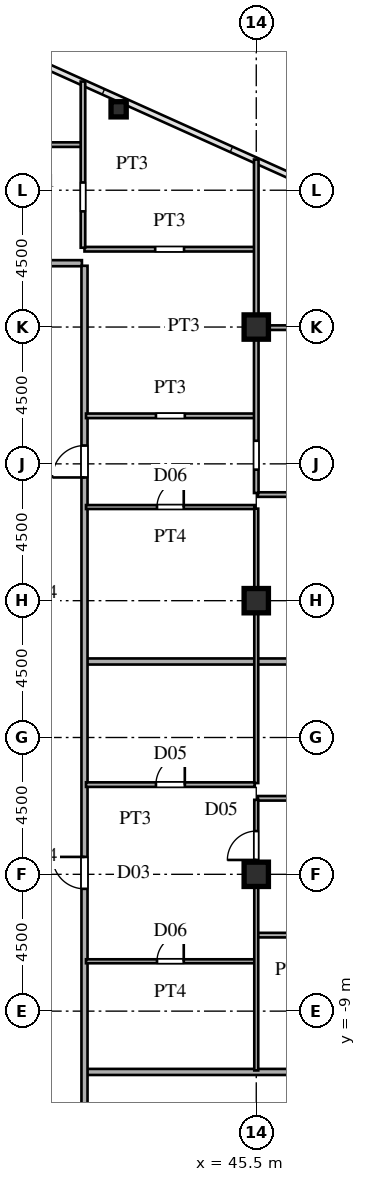
"""IFC4 building model, lengths in metres.
Left out: names, types, materials, properties, quantities, classifications, styles, units other than length and angle.
Written with IfcOpenShell. Run it as: python <this file> out.ifc"""

import sys

from ifc_helpers import new_model, si_unit, direction, frame, frame_2d, origin, origin_2d, place, context, subcontext, project, spatial, rectangle, hollow_rectangle, i_section, extrude, source, transform, mapped, element, fill, save


model = new_model("IFC4")
c1 = context("Model", 3, precision=1e-05, world=origin(), true_north=direction((0.0, 1.0)))
c2 = subcontext(c1, "Body", "Model", "MODEL_VIEW")
j1 = project(units=[si_unit("LENGTHUNIT", "METRE"), si_unit("PLANEANGLEUNIT", "RADIAN")], contexts=[c1])
p1 = place(None, origin())
s1 = spatial("IfcSite", under=j1, at=p1, CompositionType="ELEMENT")
p2 = place(p1, origin())
s2 = spatial("IfcBuilding", under=s1, at=p2, CompositionType="ELEMENT")
p3 = place(p2, frame((0.0, 0.0, 106.8)))
s3 = spatial("IfcBuildingStorey", under=s2, at=p3, CompositionType="ELEMENT", Elevation=106.8)
m1 = source(origin(), c2, "Body", "SweptSolid", [
    extrude(i_section(OverallWidth=0.8, OverallDepth=0.8, WebThickness=0.032, FlangeThickness=0.05, at=origin_2d()), origin(), (0.0, 0.0, 1.0), 3.6),
])
for number, where, z_axis, x_axis in (
    (1, (45.5, -4.5, 0.0), (0.0, 0.0, 1.0), (1.0, 0.0, 0.0)),
    (2, (45.5, 4.5, 0.0), (0.0, 0.0, 1.0), (1.0, 0.0, 0.0)),
    (3, (45.5, 13.5, 0.0), (0.0, 0.0, 1.0), (1.0, 0.0, 0.0)),
):
    element("IfcColumn", number, at=place(p3, frame(where, z_axis=z_axis, x_axis=x_axis)), inside=s3, PredefinedType="COLUMN", context=c2, shape_type="MappedRepresentation", body=[
        mapped(m1, transform((0.0, 0.0, 0.0), scale=1.0)),
    ])
m2 = source(origin(), c2, "Body", "SweptSolid", [
    extrude(hollow_rectangle(XDim=0.5, YDim=0.5, WallThickness=0.02, at=origin_2d()), origin(), (0.0, 0.0, 1.0), 3.6),
])
p4 = place(p3, frame((40.973, 20.661, 0.0), z_axis=(0.0, 0.0, 1.0), x_axis=(1.0, 0.0, 0.0)))
e4 = element("IfcColumn", 4, at=p4, inside=s3, PredefinedType="COLUMN", context=c2, shape_type="MappedRepresentation", body=[
    mapped(m2, transform((0.0, 0.0, 0.0), scale=1.0)),
])
p5 = place(p3, frame((39.93, -11.0, 0.0), z_axis=(0.0, 0.0, 1.0), x_axis=(1.0, 0.0, 0.0)))
e5 = element("IfcWall", 5, at=p5, inside=s3, PredefinedType="PARTITIONING", context=c2, shape_type="SweptSolid", body=[
    extrude(rectangle(XDim=23.304, YDim=0.2, at=frame_2d((11.652, 0.0))), origin(), (0.0, 0.0, 1.0), 3.38),
])
p6 = place(p3, frame((39.9, -7.36, 0.0), z_axis=(0.0, 0.0, 1.0), x_axis=(1.0, 0.0, 0.0)))
e6 = element("IfcWall", 6, at=p6, inside=s3, PredefinedType="PARTITIONING", context=c2, shape_type="SweptSolid", body=[
    extrude(rectangle(XDim=5.55, YDim=0.13, at=frame_2d((2.775, 0.0))), origin(), (0.0, 0.0, 1.0), 3.38),
])
p7 = place(p6, frame((2.335, 0.0, 0.0)))
e7 = element("IfcOpeningElement", 7, at=p7, cuts=e6, PredefinedType="OPENING", context=c2, shape_type="SweptSolid", body=[
    extrude(rectangle(XDim=0.88, YDim=2.1, at=frame_2d((0.44, 1.05))), frame((0.0, 0.075, 0.0), z_axis=(0.0, -1.0, 0.0), x_axis=(1.0, 0.0, 0.0)), (0.0, 0.0, 1.0), 0.15),
])
p8 = place(p3, frame((45.55, -6.5, 0.0), z_axis=(0.0, 0.0, 1.0), x_axis=(1.0, 0.0, 0.0)))
e8 = element("IfcWall", 8, at=p8, inside=s3, PredefinedType="PARTITIONING", context=c2, shape_type="SweptSolid", body=[
    extrude(rectangle(XDim=25.325, YDim=0.15, at=frame_2d((12.663, 0.0))), origin(), (0.0, 0.0, 1.0), 3.38),
])
p9 = place(p8, frame((3.975, 0.0, 0.0)))
e9 = element("IfcOpeningElement", 9, at=p9, cuts=e8, PredefinedType="OPENING", context=c2, shape_type="SweptSolid", body=[
    extrude(rectangle(XDim=0.95, YDim=2.15, at=frame_2d((0.475, 1.075))), frame((0.0, 0.085, 0.0), z_axis=(0.0, -1.0, 0.0), x_axis=(1.0, 0.0, 0.0)), (0.0, 0.0, 1.0), 0.17),
])
p10 = place(p8, frame((11.617, 0.0, 0.0)))
e10 = element("IfcOpeningElement", 10, at=p10, cuts=e8, PredefinedType="OPENING", context=c2, shape_type="SweptSolid", body=[
    extrude(rectangle(XDim=0.95, YDim=2.15, at=frame_2d((0.475, 1.075))), frame((0.0, 0.085, 0.0), z_axis=(0.0, -1.0, 0.0), x_axis=(1.0, 0.0, 0.0)), (0.0, 0.0, 1.0), 0.17),
])
p11 = place(p3, frame((45.55, -2.0, 0.0), z_axis=(0.0, 0.0, 1.0), x_axis=(1.0, 0.0, 0.0)))
e11 = element("IfcWall", 11, at=p11, inside=s3, PredefinedType="PARTITIONING", context=c2, shape_type="SweptSolid", body=[
    extrude(rectangle(XDim=25.485, YDim=0.15, at=frame_2d((12.742, 0.0))), origin(), (0.0, 0.0, 1.0), 3.38),
])
p12 = place(p11, frame((3.975, 0.0, 0.0)))
e12 = element("IfcOpeningElement", 12, at=p12, cuts=e11, PredefinedType="OPENING", context=c2, shape_type="SweptSolid", body=[
    extrude(rectangle(XDim=0.95, YDim=2.15, at=frame_2d((0.475, 1.075))), frame((0.0, 0.085, 0.0), z_axis=(0.0, -1.0, 0.0), x_axis=(1.0, 0.0, 0.0)), (0.0, 0.0, 1.0), 0.17),
])
p13 = place(p11, frame((11.325, 0.0, 0.0)))
e13 = element("IfcOpeningElement", 13, at=p13, cuts=e11, PredefinedType="OPENING", context=c2, shape_type="SweptSolid", body=[
    extrude(rectangle(XDim=0.95, YDim=2.15, at=frame_2d((0.475, 1.075))), frame((0.0, 0.085, 0.0), z_axis=(0.0, -1.0, 0.0), x_axis=(1.0, 0.0, 0.0)), (0.0, 0.0, 1.0), 0.17),
])
p14 = place(p3, frame((39.9, -1.55, 0.0), z_axis=(0.0, 0.0, 1.0), x_axis=(1.0, 0.0, 0.0)))
e14 = element("IfcWall", 14, at=p14, inside=s3, PredefinedType="PARTITIONING", context=c2, shape_type="SweptSolid", body=[
    extrude(rectangle(XDim=5.55, YDim=0.15, at=frame_2d((2.775, 0.0))), origin(), (0.0, 0.0, 1.0), 3.38),
])
p15 = place(p14, frame((2.3, 0.0, 0.0)))
e15 = element("IfcOpeningElement", 15, at=p15, cuts=e14, PredefinedType="OPENING", context=c2, shape_type="SweptSolid", body=[
    extrude(rectangle(XDim=0.95, YDim=2.15, at=frame_2d((0.475, 1.075))), frame((0.0, 0.085, 0.0), z_axis=(0.0, -1.0, 0.0), x_axis=(1.0, 0.0, 0.0)), (0.0, 0.0, 1.0), 0.17),
])
p16 = place(p3, frame((39.93, 2.5, 0.0), z_axis=(0.0, 0.0, 1.0), x_axis=(1.0, 0.0, 0.0)))
e16 = element("IfcWall", 16, at=p16, inside=s3, PredefinedType="PARTITIONING", context=c2, shape_type="SweptSolid", body=[
    extrude(rectangle(XDim=31.075, YDim=0.2, at=frame_2d((15.538, 0.0))), origin(), (0.0, 0.0, 1.0), 3.38),
])
p17 = place(p3, frame((39.9, 7.58, 0.0), z_axis=(0.0, 0.0, 1.0), x_axis=(1.0, 0.0, 0.0)))
e17 = element("IfcWall", 17, at=p17, inside=s3, PredefinedType="PARTITIONING", context=c2, shape_type="SweptSolid", body=[
    extrude(rectangle(XDim=5.55, YDim=0.13, at=frame_2d((2.775, 0.0))), origin(), (0.0, 0.0, 1.0), 3.38),
])
p18 = place(p17, frame((2.335, 0.0, 0.0)))
e18 = element("IfcOpeningElement", 18, at=p18, cuts=e17, PredefinedType="OPENING", context=c2, shape_type="SweptSolid", body=[
    extrude(rectangle(XDim=0.88, YDim=2.1, at=frame_2d((0.44, 1.05))), frame((0.0, 0.075, 0.0), z_axis=(0.0, -1.0, 0.0), x_axis=(1.0, 0.0, 0.0)), (0.0, 0.0, 1.0), 0.15),
])
p19 = place(p3, frame((45.55, 7.99, 0.0), z_axis=(0.0, 0.0, 1.0), x_axis=(1.0, 0.0, 0.0)))
e19 = element("IfcWall", 19, at=p19, inside=s3, PredefinedType="PARTITIONING", context=c2, shape_type="SweptSolid", body=[
    extrude(rectangle(XDim=24.392, YDim=0.15, at=frame_2d((12.196, 0.0))), origin(), (0.0, 0.0, 1.0), 3.38),
])
p20 = place(p19, frame((3.975, 0.0, 0.0)))
e20 = element("IfcOpeningElement", 20, at=p20, cuts=e19, PredefinedType="OPENING", context=c2, shape_type="SweptSolid", body=[
    extrude(rectangle(XDim=0.95, YDim=2.15, at=frame_2d((0.475, 1.075))), frame((0.0, 0.085, 0.0), z_axis=(0.0, -1.0, 0.0), x_axis=(1.0, 0.0, 0.0)), (0.0, 0.0, 1.0), 0.17),
])
p21 = place(p3, frame((39.9, 10.58, 0.0), z_axis=(0.0, 0.0, 1.0), x_axis=(1.0, 0.0, 0.0)))
e21 = element("IfcWall", 21, at=p21, inside=s3, PredefinedType="PARTITIONING", context=c2, shape_type="SweptSolid", body=[
    extrude(rectangle(XDim=5.55, YDim=0.15, at=frame_2d((2.775, 0.0))), origin(), (0.0, 0.0, 1.0), 3.38),
])
p22 = place(p21, frame((2.3, 0.0, 0.0)))
e22 = element("IfcOpeningElement", 22, at=p22, cuts=e21, PredefinedType="OPENING", context=c2, shape_type="SweptSolid", body=[
    extrude(rectangle(XDim=0.95, YDim=2.15, at=frame_2d((0.475, 1.075))), frame((0.0, 0.085, 0.0), z_axis=(0.0, -1.0, 0.0), x_axis=(1.0, 0.0, 0.0)), (0.0, 0.0, 1.0), 0.17),
])
p23 = place(p3, frame((45.55, 13.48, 0.0), z_axis=(0.0, 0.0, 1.0), x_axis=(1.0, 0.0, 0.0)))
e23 = element("IfcWall", 23, at=p23, inside=s3, PredefinedType="PARTITIONING", context=c2, shape_type="SweptSolid", body=[
    extrude(rectangle(XDim=1.424, YDim=0.15, at=frame_2d((0.712, 0.0))), origin(), (0.0, 0.0, 1.0), 2.08),
])
p24 = place(p3, frame((36.585, 15.6, 0.0), z_axis=(0.0, 0.0, 1.0), x_axis=(1.0, 0.0, 0.0)))
e24 = element("IfcWall", 24, at=p24, inside=s3, PredefinedType="PARTITIONING", context=c2, shape_type="SweptSolid", body=[
    extrude(rectangle(XDim=3.18, YDim=0.2, at=frame_2d((1.59, 0.0))), origin(), (0.0, 0.0, 1.0), 3.38),
])
p25 = place(p3, frame((39.85, 16.06, 0.0), z_axis=(0.0, 0.0, 1.0), x_axis=(1.0, 0.0, 0.0)))
e25 = element("IfcWall", 25, at=p25, inside=s3, PredefinedType="PARTITIONING", context=c2, shape_type="SweptSolid", body=[
    extrude(rectangle(XDim=5.6, YDim=0.15, at=frame_2d((2.8, 0.0))), origin(), (0.0, 0.0, 1.0), 3.38),
])
p26 = place(p25, frame((2.325, 0.0, 0.0)))
e26 = element("IfcOpeningElement", 26, at=p26, cuts=e25, PredefinedType="OPENING", context=c2, shape_type="SweptSolid", body=[
    extrude(rectangle(XDim=0.95, YDim=2.15, at=frame_2d((0.475, 1.075))), frame((0.0, 0.085, 0.0), z_axis=(0.0, -1.0, 0.0), x_axis=(1.0, 0.0, 0.0)), (0.0, 0.0, 1.0), 0.17),
])
p27 = place(p3, frame((27.465, 19.5, 0.0), z_axis=(0.0, 0.0, 1.0), x_axis=(1.0, 0.0, 0.0)))
e27 = element("IfcWall", 27, at=p27, inside=s3, PredefinedType="PARTITIONING", context=c2, shape_type="SweptSolid", body=[
    extrude(rectangle(XDim=12.285, YDim=0.15, at=frame_2d((6.143, 0.0))), origin(), (0.0, 0.0, 1.0), 3.38),
])
p28 = place(p27, frame((4.625, 0.0, 0.0)))
e28 = element("IfcOpeningElement", 28, at=p28, cuts=e27, PredefinedType="OPENING", context=c2, shape_type="SweptSolid", body=[
    extrude(rectangle(XDim=0.95, YDim=2.15, at=frame_2d((0.475, 1.075))), frame((0.0, 0.085, 0.0), z_axis=(0.0, -1.0, 0.0), x_axis=(1.0, 0.0, 0.0)), (0.0, 0.0, 1.0), 0.17),
])
p29 = place(p3, frame((39.8, 16.109, 0.0), z_axis=(0.0, 0.0, 1.0), x_axis=(0.0, 1.0, 0.0)))
e29 = element("IfcWall", 29, at=p29, inside=s3, PredefinedType="PARTITIONING", context=c2, shape_type="SweptSolid", body=[
    extrude(rectangle(XDim=5.466, YDim=0.15, at=frame_2d((2.733, 0.0))), origin(), (0.0, 0.0, 1.0), 3.38),
])
p30 = place(p29, frame((1.195, 0.0, 0.0)))
e30 = element("IfcOpeningElement", 30, at=p30, cuts=e29, PredefinedType="OPENING", context=c2, shape_type="SweptSolid", body=[
    extrude(rectangle(XDim=0.95, YDim=2.15, at=frame_2d((0.475, 1.075))), frame((0.0, 0.085, 0.0), z_axis=(0.0, -1.0, 0.0), x_axis=(1.0, 0.0, 0.0)), (0.0, 0.0, 1.0), 0.17),
])
p31 = place(p3, frame((39.85, -15.515, 0.0), z_axis=(0.0, 0.0, 1.0), x_axis=(0.0, 1.0, 0.0)))
e31 = element("IfcWall", 31, at=p31, inside=s3, PredefinedType="PARTITIONING", context=c2, shape_type="SweptSolid", body=[
    extrude(rectangle(XDim=31.03, YDim=0.2, at=frame_2d((15.515, 0.0))), origin(), (0.0, 0.0, 1.0), 3.38),
])
p32 = place(p31, frame((1.69, 0.0, 0.0)))
e32 = element("IfcOpeningElement", 32, at=p32, cuts=e31, PredefinedType="OPENING", context=c2, shape_type="SweptSolid", body=[
    extrude(rectangle(XDim=1.05, YDim=2.25, at=frame_2d((0.525, 1.125))), frame((0.0, 0.11, 0.0), z_axis=(0.0, -1.0, 0.0), x_axis=(1.0, 0.0, 0.0)), (0.0, 0.0, 1.0), 0.22),
])
p33 = place(p31, frame((10.538, 0.0, 0.0)))
e33 = element("IfcOpeningElement", 33, at=p33, cuts=e31, PredefinedType="OPENING", context=c2, shape_type="SweptSolid", body=[
    extrude(rectangle(XDim=1.05, YDim=2.25, at=frame_2d((0.525, 1.125))), frame((0.0, 0.11, 0.0), z_axis=(0.0, -1.0, 0.0), x_axis=(1.0, 0.0, 0.0)), (0.0, 0.0, 1.0), 0.22),
])
p34 = place(p31, frame((24.067, 0.0, 0.0)))
e34 = element("IfcOpeningElement", 34, at=p34, cuts=e31, PredefinedType="OPENING", context=c2, shape_type="SweptSolid", body=[
    extrude(rectangle(XDim=1.05, YDim=2.25, at=frame_2d((0.525, 1.125))), frame((0.0, 0.11, 0.0), z_axis=(0.0, -1.0, 0.0), x_axis=(1.0, 0.0, 0.0)), (0.0, 0.0, 1.0), 0.22),
])
p35 = place(p3, frame((45.5, -10.95, 0.0), z_axis=(0.0, 0.0, 1.0), x_axis=(0.0, 1.0, 0.0)))
e35 = element("IfcWall", 35, at=p35, inside=s3, PredefinedType="PARTITIONING", context=c2, shape_type="SweptSolid", body=[
    extrude(rectangle(XDim=8.9, YDim=0.13, at=frame_2d((4.45, 0.0))), origin(), (0.0, 0.0, 1.0), 2.78),
])
p36 = place(p35, frame((6.923, 0.0, 0.0)))
e36 = element("IfcOpeningElement", 36, at=p36, cuts=e35, PredefinedType="OPENING", context=c2, shape_type="SweptSolid", body=[
    extrude(rectangle(XDim=0.95, YDim=2.15, at=frame_2d((0.475, 1.075))), frame((0.0, 0.075, 0.0), z_axis=(0.0, -1.0, 0.0), x_axis=(1.0, 0.0, 0.0)), (0.0, 0.0, 1.0), 0.15),
])
p37 = place(p3, frame((45.5, -1.498, 0.0), z_axis=(0.0, 0.0, 1.0), x_axis=(0.0, 1.0, 0.0)))
e37 = element("IfcWall", 37, at=p37, inside=s3, PredefinedType="PARTITIONING", context=c2, shape_type="SweptSolid", body=[
    extrude(rectangle(XDim=9.025, YDim=0.13, at=frame_2d((4.513, 0.0))), origin(), (0.0, 0.0, 1.0), 2.78),
])
p38 = place(p3, frame((45.5, 8.042, 0.0), z_axis=(0.0, 0.0, 1.0), x_axis=(0.0, 1.0, 0.0)))
e38 = element("IfcWall", 38, at=p38, inside=s3, PredefinedType="PARTITIONING", context=c2, shape_type="SweptSolid", body=[
    extrude(rectangle(XDim=10.968, YDim=0.15, at=frame_2d((5.484, 0.0))), origin(), (0.0, 0.0, 1.0), 2.78),
])
p39 = place(p38, frame((0.768, 0.0, 0.0)))
e39 = element("IfcOpeningElement", 39, at=p39, cuts=e38, PredefinedType="OPENING", context=c2, shape_type="SweptSolid", body=[
    extrude(rectangle(XDim=0.95, YDim=2.15, at=frame_2d((0.475, 1.075))), frame((0.0, 0.085, 0.0), z_axis=(0.0, -1.0, 0.0), x_axis=(1.0, 0.0, 0.0)), (0.0, 0.0, 1.0), 0.17),
])
m3 = source(origin(), c2, "Body", "SweptSolid", [
    extrude(rectangle(XDim=0.88, YDim=2.1, at=frame_2d((0.44, 1.05))), frame((0.0, 0.025, 0.0), z_axis=(0.0, -1.0, 0.0), x_axis=(1.0, 0.0, 0.0)), (0.0, 0.0, 1.0), 0.05),
])
p40 = place(p7, origin())
e40 = element("IfcDoor", 40, at=p40, inside=s3, OperationType="SINGLE_SWING_RIGHT", PredefinedType="DOOR", context=c2, shape_type="MappedRepresentation", body=[
    mapped(m3, transform((0.0, 0.0, 0.0), scale=1.0)),
])
fill(e7, e40)
m4 = source(origin(), c2, "Body", "SweptSolid", [
    extrude(rectangle(XDim=0.95, YDim=2.15, at=frame_2d((0.475, 1.075))), frame((0.0, 0.025, 0.0), z_axis=(0.0, -1.0, 0.0), x_axis=(1.0, 0.0, 0.0)), (0.0, 0.0, 1.0), 0.05),
])
p41 = place(p15, origin())
e41 = element("IfcDoor", 41, at=p41, inside=s3, OperationType="SINGLE_SWING_RIGHT", PredefinedType="DOOR", context=c2, shape_type="MappedRepresentation", body=[
    mapped(m4, transform((0.0, 0.0, 0.0), scale=1.0)),
])
fill(e15, e41)
p42 = place(p18, origin())
e42 = element("IfcDoor", 42, at=p42, inside=s3, OperationType="SINGLE_SWING_RIGHT", PredefinedType="DOOR", context=c2, shape_type="MappedRepresentation", body=[
    mapped(m3, transform((0.0, 0.0, 0.0), scale=1.0)),
])
fill(e18, e42)
m5 = source(origin(), c2, "Body", "SweptSolid", [
    extrude(rectangle(XDim=1.05, YDim=2.25, at=frame_2d((0.525, 1.125))), frame((0.0, 0.025, 0.0), z_axis=(0.0, -1.0, 0.0), x_axis=(1.0, 0.0, 0.0)), (0.0, 0.0, 1.0), 0.05),
])
p43 = place(p33, origin())
e43 = element("IfcDoor", 43, at=p43, inside=s3, OperationType="SINGLE_SWING_RIGHT", PredefinedType="DOOR", context=c2, shape_type="MappedRepresentation", body=[
    mapped(m5, transform((0.0, 0.0, 0.0), scale=1.0)),
])
fill(e33, e43)
p44 = place(p34, origin())
e44 = element("IfcDoor", 44, at=p44, inside=s3, OperationType="SINGLE_SWING_LEFT", PredefinedType="DOOR", context=c2, shape_type="MappedRepresentation", body=[
    mapped(m5, transform((0.0, 0.0, 0.0), scale=1.0)),
])
fill(e34, e44)
p45 = place(p36, origin())
e45 = element("IfcDoor", 45, at=p45, inside=s3, OperationType="SINGLE_SWING_LEFT", PredefinedType="DOOR", context=c2, shape_type="MappedRepresentation", body=[
    mapped(m4, transform((0.0, 0.0, 0.0), scale=1.0)),
])
fill(e36, e45)
save(model, sys.argv[1])
